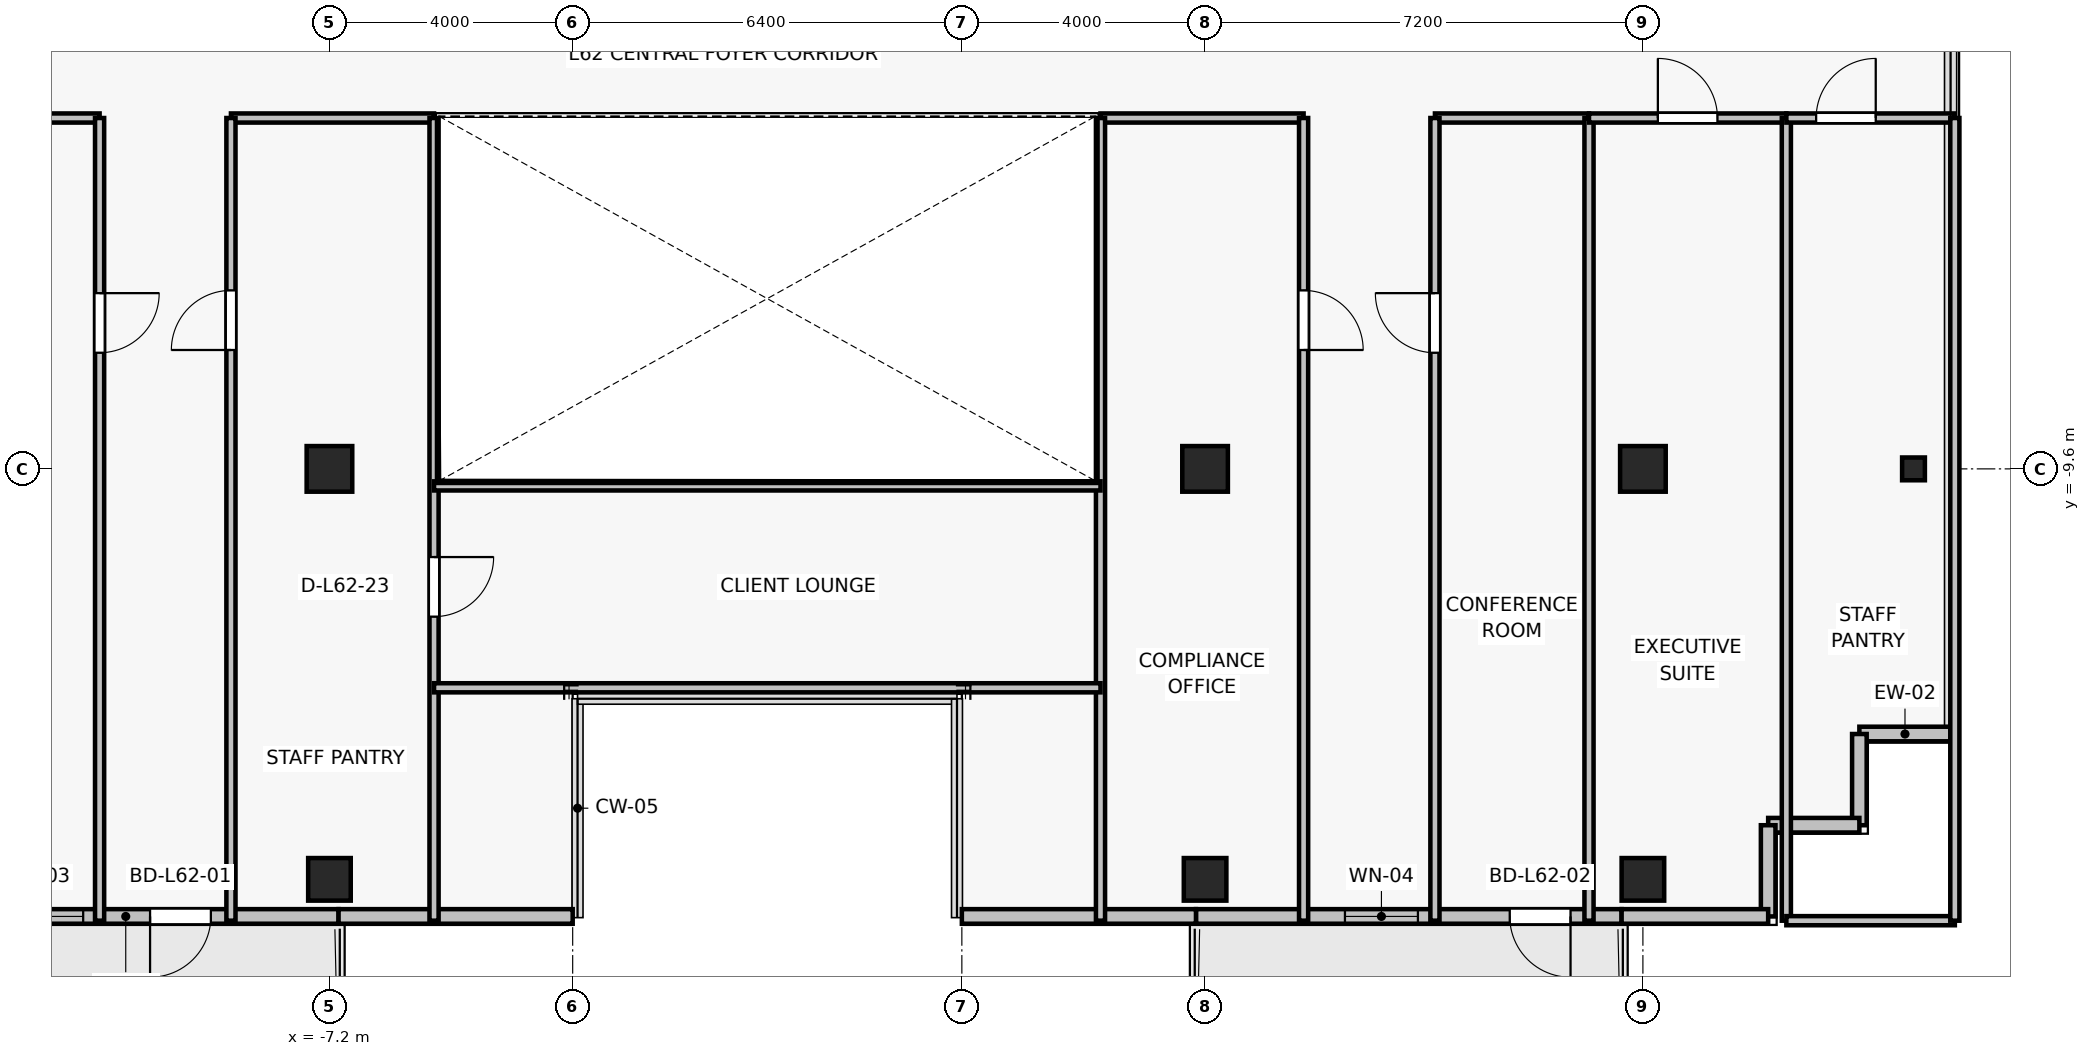
"""IFC4 building model, lengths in metres.
Left out: names, types, materials, properties, quantities, classifications, styles, units other than length and angle.
Written with IfcOpenShell. Run it as: python <this file> out.ifc"""

import sys

from ifc_helpers import new_model, si_unit, direction, frame, frame_2d, origin, origin_2d, place, context, subcontext, project, spatial, rectangle, i_section, extrude, source, transform, mapped, element, fill, save


model = new_model("IFC4")
c1 = context("Model", 3, precision=1e-05, world=origin(), true_north=direction((0.0, 1.0)))
c2 = subcontext(c1, "Body", "Model", "MODEL_VIEW")
j1 = project(units=[si_unit("LENGTHUNIT", "METRE"), si_unit("PLANEANGLEUNIT", "RADIAN")], contexts=[c1])
p1 = place(None, origin())
s1 = spatial("IfcSite", under=j1, at=p1, CompositionType="ELEMENT")
p2 = place(p1, origin())
s2 = spatial("IfcBuilding", under=s1, at=p2, CompositionType="ELEMENT")
p3 = place(p2, frame((0.0, 0.0, 222.1)))
s3 = spatial("IfcBuildingStorey", under=s2, at=p3, CompositionType="ELEMENT", Elevation=222.1)
for number, where, z_axis, x_axis in (
    (1, (-7.2, -9.6, 0.0), (0.0, 0.0, 1.0), (1.0, 0.0, 0.0)),
    (2, (7.2, -9.6, 0.0), (0.0, 0.0, 1.0), (1.0, 0.0, 0.0)),
    (3, (14.4, -9.6, 0.0), (0.0, 0.0, 1.0), (1.0, 0.0, 0.0)),
):
    element("IfcColumn", number, at=place(p3, frame(where, z_axis=z_axis, x_axis=x_axis)), inside=s3, PredefinedType="COLUMN", context=c2, shape_type="SweptSolid", body=[
        extrude(rectangle(XDim=0.75, YDim=0.75, at=origin_2d()), origin(), (0.0, 0.0, 1.0), 3.3),
    ])
for number, where, z_axis, x_axis in (
    (4, (-7.2, -16.35, 0.0), (0.0, 0.0, 1.0), (1.0, 0.0, 0.0)),
    (5, (7.2, -16.35, 0.0), (0.0, 0.0, 1.0), (1.0, 0.0, 0.0)),
    (6, (14.4, -16.35, 0.0), (0.0, 0.0, 1.0), (1.0, 0.0, 0.0)),
):
    element("IfcColumn", number, at=place(p3, frame(where, z_axis=z_axis, x_axis=x_axis)), inside=s3, PredefinedType="COLUMN", context=c2, shape_type="SweptSolid", body=[
        extrude(rectangle(XDim=0.7, YDim=0.7, at=origin_2d()), origin(), (0.0, 0.0, 1.0), 3.3),
    ])
p4 = place(p3, frame((18.85, -9.6, 0.0), z_axis=(0.0, 0.0, 1.0), x_axis=(1.0, 0.0, 0.0)))
e7 = element("IfcColumn", 7, at=p4, inside=s3, PredefinedType="COLUMN", context=c2, shape_type="SweptSolid", body=[
    extrude(i_section(OverallWidth=0.375, OverallDepth=0.375, WebThickness=0.017, FlangeThickness=0.027, FilletRadius=0.015, at=origin_2d()), origin(), (0.0, 0.0, 1.0), 3.3),
])
p5 = place(p3, frame((-7.05, -16.96, 0.0), z_axis=(0.0, 0.0, 1.0), x_axis=(-1.0, 0.0, 0.0)))
e8 = element("IfcWall", 8, at=p5, inside=s3, PredefinedType="SOLIDWALL", context=c2, shape_type="SweptSolid", body=[
    extrude(rectangle(XDim=7.0, YDim=0.24, at=frame_2d((3.5, 0.0))), origin(), (0.0, 0.0, 1.0), 2.665),
])
p6 = place(p5, frame((2.1, 0.0, 0.0)))
e9 = element("IfcOpeningElement", 9, at=p6, cuts=e8, PredefinedType="OPENING", context=c2, shape_type="SweptSolid", body=[
    extrude(rectangle(XDim=1.0, YDim=2.2, at=frame_2d((0.5, 1.1))), frame((0.0, 0.13, 0.0), z_axis=(0.0, -1.0, 0.0), x_axis=(1.0, 0.0, 0.0)), (0.0, 0.0, 1.0), 0.26),
])
p7 = place(p5, frame((4.2, 0.0, 0.85)))
e10 = element("IfcOpeningElement", 10, at=p7, cuts=e8, PredefinedType="OPENING", context=c2, shape_type="SweptSolid", body=[
    extrude(rectangle(XDim=1.5, YDim=1.6, at=frame_2d((0.75, 0.8))), frame((0.0, 0.13, 0.0), z_axis=(0.0, -1.0, 0.0), x_axis=(1.0, 0.0, 0.0)), (0.0, 0.0, 1.0), 0.26),
])
p8 = place(p3, frame((14.05, -16.96, 0.0), z_axis=(0.0, 0.0, 1.0), x_axis=(-1.0, 0.0, 0.0)))
e11 = element("IfcWall", 11, at=p8, inside=s3, PredefinedType="SOLIDWALL", context=c2, shape_type="SweptSolid", body=[
    extrude(rectangle(XDim=7.0, YDim=0.24, at=frame_2d((3.5, 0.0))), origin(), (0.0, 0.0, 1.0), 2.665),
])
p9 = place(p8, frame((0.84, 0.0, 0.0)))
e12 = element("IfcOpeningElement", 12, at=p9, cuts=e11, PredefinedType="OPENING", context=c2, shape_type="SweptSolid", body=[
    extrude(rectangle(XDim=1.0, YDim=2.2, at=frame_2d((0.5, 1.1))), frame((0.0, 0.13, 0.0), z_axis=(0.0, -1.0, 0.0), x_axis=(1.0, 0.0, 0.0)), (0.0, 0.0, 1.0), 0.26),
])
p10 = place(p8, frame((3.35, 0.0, 0.85)))
e13 = element("IfcOpeningElement", 13, at=p10, cuts=e11, PredefinedType="OPENING", context=c2, shape_type="SweptSolid", body=[
    extrude(rectangle(XDim=1.2, YDim=1.5, at=frame_2d((0.6, 0.75))), frame((0.0, 0.13, 0.0), z_axis=(0.0, -1.0, 0.0), x_axis=(1.0, 0.0, 0.0)), (0.0, 0.0, 1.0), 0.26),
])
for number, where, z_axis, x_axis in (
    (14, (17.96, -13.96, 0.0), (0.0, 0.0, 1.0), (1.0, 0.0, 0.0)),
    (15, (17.96, -15.46, 0.0), (0.0, 0.0, 1.0), (0.0, 1.0, 0.0)),
    (16, (16.46, -15.46, 0.0), (0.0, 0.0, 1.0), (1.0, 0.0, 0.0)),
    (17, (16.46, -16.96, 0.0), (0.0, 0.0, 1.0), (0.0, 1.0, 0.0)),
):
    element("IfcWall", number, at=place(p3, frame(where, z_axis=z_axis, x_axis=x_axis)), inside=s3, PredefinedType="SOLIDWALL", context=c2, shape_type="SweptSolid", body=[
        extrude(rectangle(XDim=1.5, YDim=0.24, at=frame_2d((0.75, 0.0))), origin(), (0.0, 0.0, 1.0), 3.075),
    ])
p11 = place(p3, frame((14.05, -16.96, 0.0), z_axis=(0.0, 0.0, 1.0), x_axis=(1.0, 0.0, 0.0)))
e18 = element("IfcWall", 18, at=p11, inside=s3, PredefinedType="SOLIDWALL", context=c2, shape_type="SweptSolid", body=[
    extrude(rectangle(XDim=2.41, YDim=0.24, at=frame_2d((1.205, 0.0))), origin(), (0.0, 0.0, 1.0), 3.075),
])
for number, where, z_axis, x_axis in (
    (19, (3.2, -16.96, 0.0), (0.0, 0.0, 1.0), (1.0, 0.0, 0.0)),
    (20, (-7.05, -16.96, 0.0), (0.0, 0.0, 1.0), (1.0, 0.0, 0.0)),
):
    element("IfcWall", number, at=place(p3, frame(where, z_axis=z_axis, x_axis=x_axis)), inside=s3, PredefinedType="SOLIDWALL", context=c2, shape_type="SweptSolid", body=[
        extrude(rectangle(XDim=3.85, YDim=0.24, at=frame_2d((1.925, 0.0))), origin(), (0.0, 0.0, 1.0), 3.075),
    ])
p12 = place(p3, frame((-23.53, -3.83, 0.0), z_axis=(0.0, 0.0, 1.0), x_axis=(1.0, 0.0, 0.0)))
e21 = element("IfcWall", 21, at=p12, inside=s3, PredefinedType="PARTITIONING", context=c2, shape_type="SweptSolid", body=[
    extrude(rectangle(XDim=12.55, YDim=0.15, at=frame_2d((6.275, 0.0))), origin(), (0.0, 0.0, 1.0), 2.615),
])
p13 = place(p3, frame((-10.98, -3.83, 0.0), z_axis=(0.0, 0.0, 1.0), x_axis=(0.0, -1.0, 0.0)))
e22 = element("IfcWall", 22, at=p13, inside=s3, PredefinedType="PARTITIONING", context=c2, shape_type="SweptSolid", body=[
    extrude(rectangle(XDim=13.2, YDim=0.15, at=frame_2d((6.6, 0.0))), origin(), (0.0, 0.0, 1.0), 2.615),
])
p14 = place(p13, frame((2.88, 0.0, 0.0)))
e23 = element("IfcOpeningElement", 23, at=p14, cuts=e22, PredefinedType="OPENING", context=c2, shape_type="SweptSolid", body=[
    extrude(rectangle(XDim=0.98, YDim=2.15, at=frame_2d((0.49, 1.075))), frame((0.0, 0.085, 0.0), z_axis=(0.0, -1.0, 0.0), x_axis=(1.0, 0.0, 0.0)), (0.0, 0.0, 1.0), 0.17),
])
p15 = place(p3, frame((10.98, -3.83, 0.0), z_axis=(0.0, 0.0, 1.0), x_axis=(1.0, 0.0, 0.0)))
e24 = element("IfcWall", 24, at=p15, inside=s3, PredefinedType="PARTITIONING", context=c2, shape_type="SweptSolid", body=[
    extrude(rectangle(XDim=2.533, YDim=0.15, at=frame_2d((1.267, 0.0))), origin(), (0.0, 0.0, 1.0), 3.075),
])
p16 = place(p3, frame((10.98, -17.03, 0.0), z_axis=(0.0, 0.0, 1.0), x_axis=(0.0, 1.0, 0.0)))
e25 = element("IfcWall", 25, at=p16, inside=s3, PredefinedType="PARTITIONING", context=c2, shape_type="SweptSolid", body=[
    extrude(rectangle(XDim=13.2, YDim=0.15, at=frame_2d((6.6, 0.0))), origin(), (0.0, 0.0, 1.0), 2.615),
])
p17 = place(p16, frame((9.34, 0.0, 0.0)))
e26 = element("IfcOpeningElement", 26, at=p17, cuts=e25, PredefinedType="OPENING", context=c2, shape_type="SweptSolid", body=[
    extrude(rectangle(XDim=0.98, YDim=2.15, at=frame_2d((0.49, 1.075))), frame((0.0, 0.085, 0.0), z_axis=(0.0, -1.0, 0.0), x_axis=(1.0, 0.0, 0.0)), (0.0, 0.0, 1.0), 0.17),
])
p18 = place(p3, frame((13.513, -3.83, 0.0), z_axis=(0.0, 0.0, 1.0), x_axis=(0.0, -1.0, 0.0)))
e27 = element("IfcWall", 27, at=p18, inside=s3, PredefinedType="PARTITIONING", context=c2, shape_type="SweptSolid", body=[
    extrude(rectangle(XDim=13.2, YDim=0.15, at=frame_2d((6.6, 0.0))), origin(), (0.0, 0.0, 1.0), 2.615),
])
p19 = place(p3, frame((13.513, -3.83, 0.0), z_axis=(0.0, 0.0, 1.0), x_axis=(1.0, 0.0, 0.0)))
e28 = element("IfcWall", 28, at=p19, inside=s3, PredefinedType="PARTITIONING", context=c2, shape_type="SweptSolid", body=[
    extrude(rectangle(XDim=3.246, YDim=0.15, at=frame_2d((1.623, 0.0))), origin(), (0.0, 0.0, 1.0), 2.615),
])
p20 = place(p19, frame((1.133, 0.0, 0.0)))
e29 = element("IfcOpeningElement", 29, at=p20, cuts=e28, PredefinedType="OPENING", context=c2, shape_type="SweptSolid", body=[
    extrude(rectangle(XDim=0.98, YDim=2.15, at=frame_2d((0.49, 1.075))), frame((0.0, 0.085, 0.0), z_axis=(0.0, -1.0, 0.0), x_axis=(1.0, 0.0, 0.0)), (0.0, 0.0, 1.0), 0.17),
])
p21 = place(p3, frame((16.759, -3.83, 0.0), z_axis=(0.0, 0.0, 1.0), x_axis=(0.0, -1.0, 0.0)))
e30 = element("IfcWall", 30, at=p21, inside=s3, PredefinedType="PARTITIONING", context=c2, shape_type="SweptSolid", body=[
    extrude(rectangle(XDim=13.2, YDim=0.15, at=frame_2d((6.6, 0.0))), origin(), (0.0, 0.0, 1.0), 2.615),
])
p22 = place(p3, frame((19.53, -17.03, 0.0), z_axis=(0.0, 0.0, 1.0), x_axis=(-1.0, 0.0, 0.0)))
e31 = element("IfcWall", 31, at=p22, inside=s3, PredefinedType="PARTITIONING", context=c2, shape_type="SweptSolid", body=[
    extrude(rectangle(XDim=2.771, YDim=0.15, at=frame_2d((1.385, 0.0))), origin(), (0.0, 0.0, 1.0), 3.075),
])
p23 = place(p3, frame((16.759, -3.83, 0.0), z_axis=(0.0, 0.0, 1.0), x_axis=(1.0, 0.0, 0.0)))
e32 = element("IfcWall", 32, at=p23, inside=s3, PredefinedType="PARTITIONING", context=c2, shape_type="SweptSolid", body=[
    extrude(rectangle(XDim=2.771, YDim=0.15, at=frame_2d((1.385, 0.0))), origin(), (0.0, 0.0, 1.0), 2.765),
])
p24 = place(p23, frame((0.49, 0.0, 0.0)))
e33 = element("IfcOpeningElement", 33, at=p24, cuts=e32, PredefinedType="OPENING", context=c2, shape_type="SweptSolid", body=[
    extrude(rectangle(XDim=0.98, YDim=2.15, at=frame_2d((0.49, 1.075))), frame((0.0, 0.085, 0.0), z_axis=(0.0, -1.0, 0.0), x_axis=(1.0, 0.0, 0.0)), (0.0, 0.0, 1.0), 0.17),
])
p25 = place(p3, frame((19.53, -3.83, 0.0), z_axis=(0.0, 0.0, 1.0), x_axis=(0.0, -1.0, 0.0)))
e34 = element("IfcWall", 34, at=p25, inside=s3, PredefinedType="PARTITIONING", context=c2, shape_type="SweptSolid", body=[
    extrude(rectangle(XDim=13.2, YDim=0.15, at=frame_2d((6.6, 0.0))), origin(), (0.0, 0.0, 1.0), 2.665),
])
p26 = place(p3, frame((-8.82, -3.83, 0.0), z_axis=(0.0, 0.0, 1.0), x_axis=(1.0, 0.0, 0.0)))
e35 = element("IfcWall", 35, at=p26, inside=s3, PredefinedType="PARTITIONING", context=c2, shape_type="SweptSolid", body=[
    extrude(rectangle(XDim=3.34, YDim=0.15, at=frame_2d((1.67, 0.0))), origin(), (0.0, 0.0, 1.0), 2.615),
])
p27 = place(p3, frame((-8.82, -17.03, 0.0), z_axis=(0.0, 0.0, 1.0), x_axis=(0.0, 1.0, 0.0)))
e36 = element("IfcWall", 36, at=p27, inside=s3, PredefinedType="PARTITIONING", context=c2, shape_type="SweptSolid", body=[
    extrude(rectangle(XDim=13.2, YDim=0.15, at=frame_2d((6.6, 0.0))), origin(), (0.0, 0.0, 1.0), 2.615),
])
p28 = place(p27, frame((9.385, 0.0, 0.0)))
e37 = element("IfcOpeningElement", 37, at=p28, cuts=e36, PredefinedType="OPENING", context=c2, shape_type="SweptSolid", body=[
    extrude(rectangle(XDim=0.98, YDim=2.15, at=frame_2d((0.49, 1.075))), frame((0.0, 0.085, 0.0), z_axis=(0.0, -1.0, 0.0), x_axis=(1.0, 0.0, 0.0)), (0.0, 0.0, 1.0), 0.17),
])
p29 = place(p3, frame((-5.48, -3.83, 0.0), z_axis=(0.0, 0.0, 1.0), x_axis=(0.0, -1.0, 0.0)))
e38 = element("IfcWall", 38, at=p29, inside=s3, PredefinedType="PARTITIONING", context=c2, shape_type="SweptSolid", body=[
    extrude(rectangle(XDim=13.2, YDim=0.15, at=frame_2d((6.6, 0.0))), origin(), (0.0, 0.0, 1.0), 2.615),
])
p30 = place(p29, frame((7.22, 0.0, 0.0)))
e39 = element("IfcOpeningElement", 39, at=p30, cuts=e38, PredefinedType="OPENING", context=c2, shape_type="SweptSolid", body=[
    extrude(rectangle(XDim=0.98, YDim=2.15, at=frame_2d((0.49, 1.075))), frame((0.0, 0.085, 0.0), z_axis=(0.0, -1.0, 0.0), x_axis=(1.0, 0.0, 0.0)), (0.0, 0.0, 1.0), 0.17),
])
p31 = place(p3, frame((5.48, -3.83, 0.0), z_axis=(0.0, 0.0, 1.0), x_axis=(1.0, 0.0, 0.0)))
e40 = element("IfcWall", 40, at=p31, inside=s3, PredefinedType="PARTITIONING", context=c2, shape_type="SweptSolid", body=[
    extrude(rectangle(XDim=3.34, YDim=0.15, at=frame_2d((1.67, 0.0))), origin(), (0.0, 0.0, 1.0), 2.615),
])
p32 = place(p3, frame((5.48, -17.03, 0.0), z_axis=(0.0, 0.0, 1.0), x_axis=(0.0, 1.0, 0.0)))
e41 = element("IfcWall", 41, at=p32, inside=s3, PredefinedType="PARTITIONING", context=c2, shape_type="SweptSolid", body=[
    extrude(rectangle(XDim=13.2, YDim=0.15, at=frame_2d((6.6, 0.0))), origin(), (0.0, 0.0, 1.0), 2.615),
])
p33 = place(p3, frame((8.82, -3.83, 0.0), z_axis=(0.0, 0.0, 1.0), x_axis=(0.0, -1.0, 0.0)))
e42 = element("IfcWall", 42, at=p33, inside=s3, PredefinedType="PARTITIONING", context=c2, shape_type="SweptSolid", body=[
    extrude(rectangle(XDim=13.2, YDim=0.15, at=frame_2d((6.6, 0.0))), origin(), (0.0, 0.0, 1.0), 2.615),
])
p34 = place(p33, frame((2.835, 0.0, 0.0)))
e43 = element("IfcOpeningElement", 43, at=p34, cuts=e42, PredefinedType="OPENING", context=c2, shape_type="SweptSolid", body=[
    extrude(rectangle(XDim=0.98, YDim=2.15, at=frame_2d((0.49, 1.075))), frame((0.0, 0.085, 0.0), z_axis=(0.0, -1.0, 0.0), x_axis=(1.0, 0.0, 0.0)), (0.0, 0.0, 1.0), 0.17),
])
p35 = place(p3, frame((5.48, -13.2, 0.0), z_axis=(0.0, 0.0, 1.0), x_axis=(-1.0, 0.0, 0.0)))
e44 = element("IfcWall", 44, at=p35, inside=s3, PredefinedType="PARTITIONING", context=c2, shape_type="SweptSolid", body=[
    extrude(rectangle(XDim=10.96, YDim=0.15, at=frame_2d((5.48, 0.0))), origin(), (0.0, 0.0, 1.0), 2.765),
])
p36 = place(p3, frame((-5.48, -9.88, 0.0), z_axis=(0.0, 0.0, 1.0), x_axis=(1.0, 0.0, 0.0)))
e45 = element("IfcWall", 45, at=p36, inside=s3, PredefinedType="PARTITIONING", context=c2, shape_type="SweptSolid", body=[
    extrude(rectangle(XDim=10.96, YDim=0.15, at=frame_2d((5.48, 0.0))), origin(), (0.0, 0.0, 1.0), 2.615),
])
m1 = source(origin(), c2, "Body", "SweptSolid", [
    extrude(rectangle(XDim=1.0, YDim=2.2, at=frame_2d((0.5, 1.1))), frame((0.0, 0.025, 0.0), z_axis=(0.0, -1.0, 0.0), x_axis=(1.0, 0.0, 0.0)), (0.0, 0.0, 1.0), 0.05),
])
p37 = place(p6, origin())
e46 = element("IfcDoor", 46, at=p37, inside=s3, OperationType="SINGLE_SWING_RIGHT", PredefinedType="DOOR", context=c2, shape_type="MappedRepresentation", body=[
    mapped(m1, transform((0.0, 0.0, 0.0), x_axis=(1.0, 0.0, 0.0), y_axis=(0.0, 1.0, 0.0), z_axis=(0.0, 0.0, 1.0), scale=1.0)),
])
fill(e9, e46)
m2 = source(origin(), c2, "Body", "SweptSolid", [
    extrude(rectangle(XDim=1.5, YDim=1.6, at=frame_2d((0.75, 0.8))), frame((0.0, 0.03, 0.0), z_axis=(0.0, -1.0, 0.0), x_axis=(1.0, 0.0, 0.0)), (0.0, 0.0, 1.0), 0.06),
])
p38 = place(p7, origin())
e47 = element("IfcWindow", 47, at=p38, inside=s3, PartitioningType="SINGLE_PANEL", PredefinedType="WINDOW", context=c2, shape_type="MappedRepresentation", body=[
    mapped(m2, transform((0.0, 0.0, 0.0), x_axis=(1.0, 0.0, 0.0), y_axis=(0.0, 1.0, 0.0), z_axis=(0.0, 0.0, 1.0), scale=1.0)),
])
fill(e10, e47)
p39 = place(p9, origin())
e48 = element("IfcDoor", 48, at=p39, inside=s3, OperationType="SINGLE_SWING_LEFT", PredefinedType="DOOR", context=c2, shape_type="MappedRepresentation", body=[
    mapped(m1, transform((0.0, 0.0, 0.0), x_axis=(1.0, 0.0, 0.0), y_axis=(0.0, 1.0, 0.0), z_axis=(0.0, 0.0, 1.0), scale=1.0)),
])
fill(e12, e48)
m3 = source(origin(), c2, "Body", "SweptSolid", [
    extrude(rectangle(XDim=1.2, YDim=1.5, at=frame_2d((0.6, 0.75))), frame((0.0, 0.03, 0.0), z_axis=(0.0, -1.0, 0.0), x_axis=(1.0, 0.0, 0.0)), (0.0, 0.0, 1.0), 0.06),
])
p40 = place(p10, origin())
e49 = element("IfcWindow", 49, at=p40, inside=s3, PartitioningType="SINGLE_PANEL", PredefinedType="WINDOW", context=c2, shape_type="MappedRepresentation", body=[
    mapped(m3, transform((0.0, 0.0, 0.0), x_axis=(1.0, 0.0, 0.0), y_axis=(0.0, 1.0, 0.0), z_axis=(0.0, 0.0, 1.0), scale=1.0)),
])
fill(e13, e49)
m4 = source(origin(), c2, "Body", "SweptSolid", [
    extrude(rectangle(XDim=0.98, YDim=2.15, at=frame_2d((0.49, 1.075))), frame((0.0, 0.025, 0.0), z_axis=(0.0, -1.0, 0.0), x_axis=(1.0, 0.0, 0.0)), (0.0, 0.0, 1.0), 0.05),
])
p41 = place(p14, origin())
e50 = element("IfcDoor", 50, at=p41, inside=s3, OperationType="SINGLE_SWING_LEFT", PredefinedType="DOOR", context=c2, shape_type="MappedRepresentation", body=[
    mapped(m4, transform((0.0, 0.0, 0.0), x_axis=(1.0, 0.0, 0.0), y_axis=(0.0, 1.0, 0.0), z_axis=(0.0, 0.0, 1.0), scale=1.0)),
])
fill(e23, e50)
p42 = place(p17, origin())
e51 = element("IfcDoor", 51, at=p42, inside=s3, OperationType="SINGLE_SWING_RIGHT", PredefinedType="DOOR", context=c2, shape_type="MappedRepresentation", body=[
    mapped(m4, transform((0.0, 0.0, 0.0), x_axis=(1.0, 0.0, 0.0), y_axis=(0.0, 1.0, 0.0), z_axis=(0.0, 0.0, 1.0), scale=1.0)),
])
fill(e26, e51)
p43 = place(p20, origin())
e52 = element("IfcDoor", 52, at=p43, inside=s3, OperationType="SINGLE_SWING_LEFT", PredefinedType="DOOR", context=c2, shape_type="MappedRepresentation", body=[
    mapped(m4, transform((0.0, 0.0, 0.0), x_axis=(1.0, 0.0, 0.0), y_axis=(0.0, 1.0, 0.0), z_axis=(0.0, 0.0, 1.0), scale=1.0)),
])
fill(e29, e52)
p44 = place(p24, origin())
e53 = element("IfcDoor", 53, at=p44, inside=s3, OperationType="SINGLE_SWING_RIGHT", PredefinedType="DOOR", context=c2, shape_type="MappedRepresentation", body=[
    mapped(m4, transform((0.0, 0.0, 0.0), x_axis=(1.0, 0.0, 0.0), y_axis=(0.0, 1.0, 0.0), z_axis=(0.0, 0.0, 1.0), scale=1.0)),
])
fill(e33, e53)
p45 = place(p28, origin())
e54 = element("IfcDoor", 54, at=p45, inside=s3, OperationType="SINGLE_SWING_LEFT", PredefinedType="DOOR", context=c2, shape_type="MappedRepresentation", body=[
    mapped(m4, transform((0.0, 0.0, 0.0), x_axis=(1.0, 0.0, 0.0), y_axis=(0.0, 1.0, 0.0), z_axis=(0.0, 0.0, 1.0), scale=1.0)),
])
fill(e37, e54)
p46 = place(p34, origin())
e55 = element("IfcDoor", 55, at=p46, inside=s3, OperationType="SINGLE_SWING_RIGHT", PredefinedType="DOOR", context=c2, shape_type="MappedRepresentation", body=[
    mapped(m4, transform((0.0, 0.0, 0.0), x_axis=(1.0, 0.0, 0.0), y_axis=(0.0, 1.0, 0.0), z_axis=(0.0, 0.0, 1.0), scale=1.0)),
])
fill(e43, e55)
p47 = place(p30, origin())
e56 = element("IfcDoor", 56, at=p47, inside=s3, OperationType="SINGLE_SWING_LEFT", PredefinedType="DOOR", context=c2, shape_type="MappedRepresentation", body=[
    mapped(m4, transform((0.0, 0.0, 0.0), x_axis=(1.0, 0.0, 0.0), y_axis=(0.0, 1.0, 0.0), z_axis=(0.0, 0.0, 1.0), scale=1.0)),
])
fill(e39, e56)
save(model, sys.argv[1])
